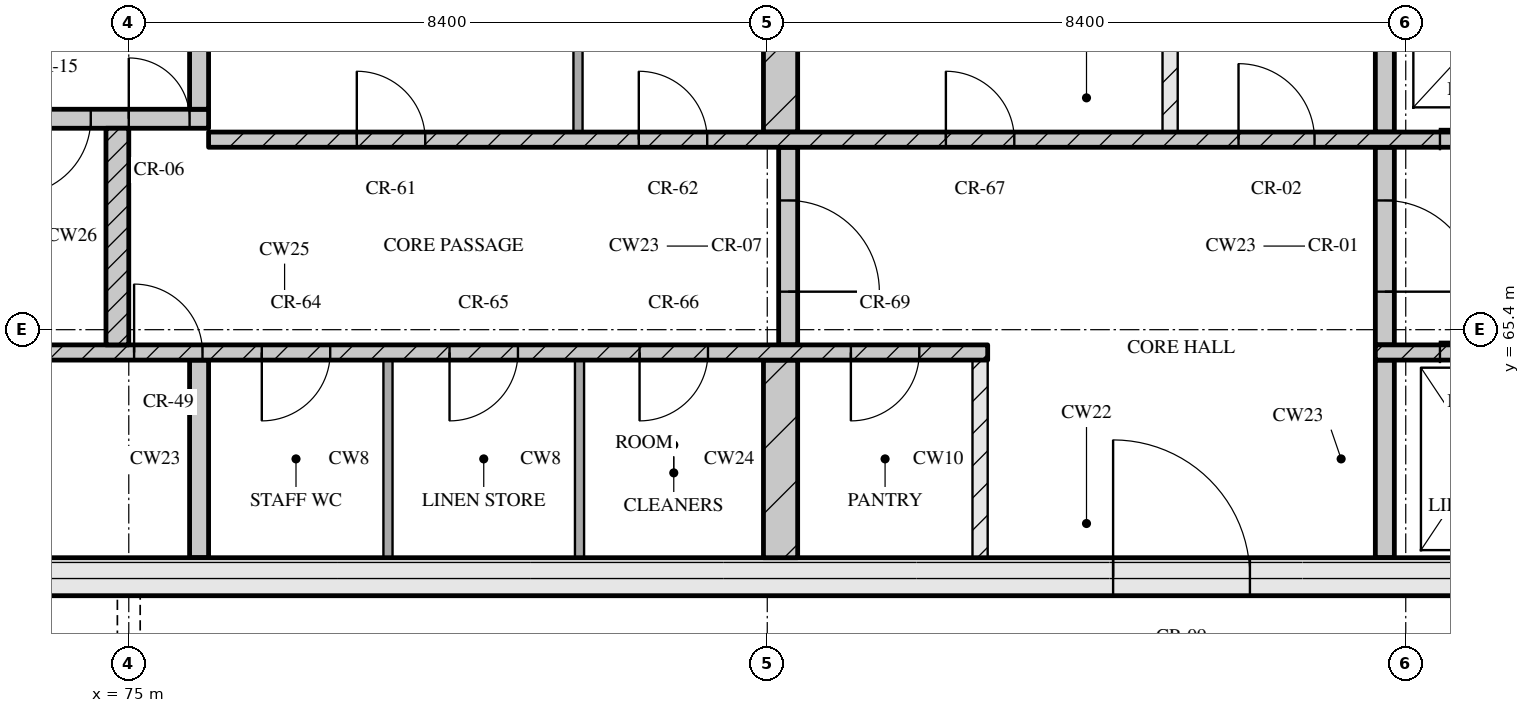
"""IFC4 building model, lengths in metres.
Left out: names, types, materials, properties, quantities, classifications, styles, units other than length and angle.
Written with IfcOpenShell. Run it as: python <this file> out.ifc"""

import sys

from ifc_helpers import new_model, si_unit, direction, frame, frame_2d, origin, place, context, subcontext, project, spatial, rectangle, extrude, element, fill, save


model = new_model("IFC4")
c1 = context("Model", 3, precision=1e-05, world=origin(), true_north=direction((0.0, 1.0)))
c2 = subcontext(c1, "Body", "Model", "MODEL_VIEW")
j1 = project(units=[si_unit("LENGTHUNIT", "METRE"), si_unit("PLANEANGLEUNIT", "RADIAN")], contexts=[c1])
p1 = place(None, origin())
s1 = spatial("IfcSite", under=j1, at=p1, CompositionType="ELEMENT")
p2 = place(p1, origin())
s2 = spatial("IfcBuilding", under=s1, at=p2, CompositionType="ELEMENT")
p3 = place(p2, frame((0.0, 0.0, 292.35)))
s3 = spatial("IfcBuildingStorey", under=s2, at=p3, CompositionType="ELEMENT", Elevation=292.35)
p4 = place(p3, frame((67.3, 62.15, 0.0), z_axis=(0.0, 0.0, 1.0), x_axis=(1.0, 0.0, 0.0)))
e1 = element("IfcWall", 1, at=p4, inside=s3, PredefinedType="SOLIDWALL", context=c2, shape_type="SweptSolid", body=[
    extrude(rectangle(XDim=40.6, YDim=0.5, at=frame_2d((20.3, 0.0))), origin(), (0.0, 0.0, 1.0), 3.32),
])
p5 = place(p4, frame((20.65, 0.0, 0.0)))
e2 = element("IfcOpeningElement", 2, at=p5, cuts=e1, PredefinedType="OPENING", context=c2, shape_type="SweptSolid", body=[
    extrude(rectangle(XDim=1.8, YDim=2.1, at=frame_2d((0.9, 1.05))), frame((0.0, 0.26, 0.0), z_axis=(0.0, -1.0, 0.0), x_axis=(1.0, 0.0, 0.0)), (0.0, 0.0, 1.0), 0.52),
])
p6 = place(p3, frame((75.925, 62.4, 0.0), z_axis=(0.0, 0.0, 1.0), x_axis=(0.0, 1.0, 0.0)))
e3 = element("IfcWall", 3, at=p6, inside=s3, PredefinedType="SOLIDWALL", context=c2, shape_type="SweptSolid", body=[
    extrude(rectangle(XDim=2.6, YDim=0.25, at=frame_2d((1.3, 0.0))), origin(), (0.0, 0.0, 1.0), 3.32),
])
for number, where, z_axis, x_axis in (
    (4, (78.41, 62.4, 0.0), (0.0, 0.0, 1.0), (0.0, 1.0, 0.0)),
    (5, (80.93, 62.4, 0.0), (0.0, 0.0, 1.0), (0.0, 1.0, 0.0)),
):
    element("IfcWall", number, at=place(p3, frame(where, z_axis=z_axis, x_axis=x_axis)), inside=s3, PredefinedType="PARTITIONING", context=c2, shape_type="SweptSolid", body=[
        extrude(rectangle(XDim=2.6, YDim=0.12, at=frame_2d((1.3, 0.0))), origin(), (0.0, 0.0, 1.0), 3.32),
    ])
p7 = place(p3, frame((83.575, 62.4, 0.0), z_axis=(0.0, 0.0, 1.0), x_axis=(0.0, 1.0, 0.0)))
e6 = element("IfcWall", 6, at=p7, inside=s3, PredefinedType="SOLIDWALL", context=c2, shape_type="SweptSolid", body=[
    extrude(rectangle(XDim=2.6, YDim=0.45, at=frame_2d((1.3, 0.0))), origin(), (0.0, 0.0, 1.0), 3.32),
])
p8 = place(p3, frame((86.2, 62.4, 0.0), z_axis=(0.0, 0.0, 1.0), x_axis=(0.0, 1.0, 0.0)))
e7 = element("IfcWall", 7, at=p8, inside=s3, PredefinedType="PARTITIONING", context=c2, shape_type="SweptSolid", body=[
    extrude(rectangle(XDim=2.6, YDim=0.2, at=frame_2d((1.3, 0.0))), origin(), (0.0, 0.0, 1.0), 3.32),
])
p9 = place(p3, frame((91.525, 62.4, 0.0), z_axis=(0.0, 0.0, 1.0), x_axis=(0.0, 1.0, 0.0)))
e8 = element("IfcWall", 8, at=p9, inside=s3, PredefinedType="SOLIDWALL", context=c2, shape_type="SweptSolid", body=[
    extrude(rectangle(XDim=2.6, YDim=0.25, at=frame_2d((1.3, 0.0))), origin(), (0.0, 0.0, 1.0), 3.32),
])
p10 = place(p3, frame((67.8, 65.1, 0.0), z_axis=(0.0, 0.0, 1.0), x_axis=(1.0, 0.0, 0.0)))
e9 = element("IfcWall", 9, at=p10, inside=s3, PredefinedType="SOLIDWALL", context=c2, shape_type="SweptSolid", body=[
    extrude(rectangle(XDim=18.5, YDim=0.2, at=frame_2d((9.25, 0.0))), origin(), (0.0, 0.0, 1.0), 3.32),
])
p11 = place(p10, frame((7.27, 0.0, 0.0)))
e10 = element("IfcOpeningElement", 10, at=p11, cuts=e9, PredefinedType="OPENING", context=c2, shape_type="SweptSolid", body=[
    extrude(rectangle(XDim=0.9, YDim=2.1, at=frame_2d((0.45, 1.05))), frame((0.0, 0.11, 0.0), z_axis=(0.0, -1.0, 0.0), x_axis=(1.0, 0.0, 0.0)), (0.0, 0.0, 1.0), 0.22),
])
p12 = place(p10, frame((8.95, 0.0, 0.0)))
e11 = element("IfcOpeningElement", 11, at=p12, cuts=e9, PredefinedType="OPENING", context=c2, shape_type="SweptSolid", body=[
    extrude(rectangle(XDim=0.9, YDim=2.1, at=frame_2d((0.45, 1.05))), frame((0.0, 0.11, 0.0), z_axis=(0.0, -1.0, 0.0), x_axis=(1.0, 0.0, 0.0)), (0.0, 0.0, 1.0), 0.22),
])
p13 = place(p10, frame((11.42, 0.0, 0.0)))
e12 = element("IfcOpeningElement", 12, at=p13, cuts=e9, PredefinedType="OPENING", context=c2, shape_type="SweptSolid", body=[
    extrude(rectangle(XDim=0.9, YDim=2.1, at=frame_2d((0.45, 1.05))), frame((0.0, 0.11, 0.0), z_axis=(0.0, -1.0, 0.0), x_axis=(1.0, 0.0, 0.0)), (0.0, 0.0, 1.0), 0.22),
])
p14 = place(p10, frame((13.92, 0.0, 0.0)))
e13 = element("IfcOpeningElement", 13, at=p14, cuts=e9, PredefinedType="OPENING", context=c2, shape_type="SweptSolid", body=[
    extrude(rectangle(XDim=0.9, YDim=2.1, at=frame_2d((0.45, 1.05))), frame((0.0, 0.11, 0.0), z_axis=(0.0, -1.0, 0.0), x_axis=(1.0, 0.0, 0.0)), (0.0, 0.0, 1.0), 0.22),
])
p15 = place(p10, frame((16.7, 0.0, 0.0)))
e14 = element("IfcOpeningElement", 14, at=p15, cuts=e9, PredefinedType="OPENING", context=c2, shape_type="SweptSolid", body=[
    extrude(rectangle(XDim=0.9, YDim=2.1, at=frame_2d((0.45, 1.05))), frame((0.0, 0.11, 0.0), z_axis=(0.0, -1.0, 0.0), x_axis=(1.0, 0.0, 0.0)), (0.0, 0.0, 1.0), 0.22),
])
p16 = place(p3, frame((91.4, 65.1, 0.0), z_axis=(0.0, 0.0, 1.0), x_axis=(1.0, 0.0, 0.0)))
e15 = element("IfcWall", 15, at=p16, inside=s3, PredefinedType="SOLIDWALL", context=c2, shape_type="SweptSolid", body=[
    extrude(rectangle(XDim=16.0, YDim=0.2, at=frame_2d((8.0, 0.0))), origin(), (0.0, 0.0, 1.0), 3.32),
])
p17 = place(p16, frame((0.85, 0.0, 0.0)))
e16 = element("IfcOpeningElement", 16, at=p17, cuts=e15, PredefinedType="OPENING", context=c2, shape_type="SweptSolid", body=[
    extrude(rectangle(XDim=1.1, YDim=2.1, at=frame_2d((0.55, 1.05))), frame((0.0, 0.11, 0.0), z_axis=(0.0, -1.0, 0.0), x_axis=(1.0, 0.0, 0.0)), (0.0, 0.0, 1.0), 0.22),
])
p18 = place(p16, frame((3.35, 0.0, 0.0)))
e17 = element("IfcOpeningElement", 17, at=p18, cuts=e15, PredefinedType="OPENING", context=c2, shape_type="SweptSolid", body=[
    extrude(rectangle(XDim=1.1, YDim=2.1, at=frame_2d((0.55, 1.05))), frame((0.0, 0.11, 0.0), z_axis=(0.0, -1.0, 0.0), x_axis=(1.0, 0.0, 0.0)), (0.0, 0.0, 1.0), 0.22),
])
p19 = place(p16, frame((5.85, 0.0, 0.0)))
e18 = element("IfcOpeningElement", 18, at=p19, cuts=e15, PredefinedType="OPENING", context=c2, shape_type="SweptSolid", body=[
    extrude(rectangle(XDim=1.1, YDim=2.1, at=frame_2d((0.55, 1.05))), frame((0.0, 0.11, 0.0), z_axis=(0.0, -1.0, 0.0), x_axis=(1.0, 0.0, 0.0)), (0.0, 0.0, 1.0), 0.22),
])
p20 = place(p16, frame((7.83, 0.0, 0.0)))
e19 = element("IfcOpeningElement", 19, at=p20, cuts=e15, PredefinedType="OPENING", context=c2, shape_type="SweptSolid", body=[
    extrude(rectangle(XDim=0.9, YDim=2.1, at=frame_2d((0.45, 1.05))), frame((0.0, 0.11, 0.0), z_axis=(0.0, -1.0, 0.0), x_axis=(1.0, 0.0, 0.0)), (0.0, 0.0, 1.0), 0.22),
])
p21 = place(p3, frame((74.85, 65.2, 0.0), z_axis=(0.0, 0.0, 1.0), x_axis=(0.0, 1.0, 0.0)))
e20 = element("IfcWall", 20, at=p21, inside=s3, PredefinedType="SOLIDWALL", context=c2, shape_type="SweptSolid", body=[
    extrude(rectangle(XDim=2.85, YDim=0.3, at=frame_2d((1.425, 0.0))), origin(), (0.0, 0.0, 1.0), 3.32),
])
p22 = place(p3, frame((83.675, 65.2, 0.0), z_axis=(0.0, 0.0, 1.0), x_axis=(0.0, 1.0, 0.0)))
e21 = element("IfcWall", 21, at=p22, inside=s3, PredefinedType="SOLIDWALL", context=c2, shape_type="SweptSolid", body=[
    extrude(rectangle(XDim=2.6, YDim=0.25, at=frame_2d((1.3, 0.0))), origin(), (0.0, 0.0, 1.0), 3.32),
])
p23 = place(p22, frame((0.7, 0.0, 0.0)))
e22 = element("IfcOpeningElement", 22, at=p23, cuts=e21, PredefinedType="OPENING", context=c2, shape_type="SweptSolid", body=[
    extrude(rectangle(XDim=1.2, YDim=2.1, at=frame_2d((0.6, 1.05))), frame((0.0, 0.135, 0.0), z_axis=(0.0, -1.0, 0.0), x_axis=(1.0, 0.0, 0.0)), (0.0, 0.0, 1.0), 0.27),
])
p24 = place(p3, frame((91.525, 65.2, 0.0), z_axis=(0.0, 0.0, 1.0), x_axis=(0.0, 1.0, 0.0)))
e23 = element("IfcWall", 23, at=p24, inside=s3, PredefinedType="SOLIDWALL", context=c2, shape_type="SweptSolid", body=[
    extrude(rectangle(XDim=2.6, YDim=0.25, at=frame_2d((1.3, 0.0))), origin(), (0.0, 0.0, 1.0), 3.32),
])
p25 = place(p24, frame((0.7, 0.0, 0.0)))
e24 = element("IfcOpeningElement", 24, at=p25, cuts=e23, PredefinedType="OPENING", context=c2, shape_type="SweptSolid", body=[
    extrude(rectangle(XDim=1.2, YDim=2.1, at=frame_2d((0.6, 1.05))), frame((0.0, 0.135, 0.0), z_axis=(0.0, -1.0, 0.0), x_axis=(1.0, 0.0, 0.0)), (0.0, 0.0, 1.0), 0.27),
])
p26 = place(p3, frame((76.05, 67.9, 0.0), z_axis=(0.0, 0.0, 1.0), x_axis=(1.0, 0.0, 0.0)))
e25 = element("IfcWall", 25, at=p26, inside=s3, PredefinedType="SOLIDWALL", context=c2, shape_type="SweptSolid", body=[
    extrude(rectangle(XDim=23.1, YDim=0.2, at=frame_2d((11.55, 0.0))), origin(), (0.0, 0.0, 1.0), 3.32),
])
p27 = place(p26, frame((1.95, 0.0, 0.0)))
e26 = element("IfcOpeningElement", 26, at=p27, cuts=e25, PredefinedType="OPENING", context=c2, shape_type="SweptSolid", body=[
    extrude(rectangle(XDim=0.9, YDim=2.1, at=frame_2d((0.45, 1.05))), frame((0.0, 0.11, 0.0), z_axis=(0.0, -1.0, 0.0), x_axis=(1.0, 0.0, 0.0)), (0.0, 0.0, 1.0), 0.22),
])
p28 = place(p26, frame((5.66, 0.0, 0.0)))
e27 = element("IfcOpeningElement", 27, at=p28, cuts=e25, PredefinedType="OPENING", context=c2, shape_type="SweptSolid", body=[
    extrude(rectangle(XDim=0.9, YDim=2.1, at=frame_2d((0.45, 1.05))), frame((0.0, 0.11, 0.0), z_axis=(0.0, -1.0, 0.0), x_axis=(1.0, 0.0, 0.0)), (0.0, 0.0, 1.0), 0.22),
])
p29 = place(p26, frame((9.7, 0.0, 0.0)))
e28 = element("IfcOpeningElement", 28, at=p29, cuts=e25, PredefinedType="OPENING", context=c2, shape_type="SweptSolid", body=[
    extrude(rectangle(XDim=0.9, YDim=2.1, at=frame_2d((0.45, 1.05))), frame((0.0, 0.11, 0.0), z_axis=(0.0, -1.0, 0.0), x_axis=(1.0, 0.0, 0.0)), (0.0, 0.0, 1.0), 0.22),
])
p30 = place(p26, frame((13.55, 0.0, 0.0)))
e29 = element("IfcOpeningElement", 29, at=p30, cuts=e25, PredefinedType="OPENING", context=c2, shape_type="SweptSolid", body=[
    extrude(rectangle(XDim=1.0, YDim=2.1, at=frame_2d((0.5, 1.05))), frame((0.0, 0.11, 0.0), z_axis=(0.0, -1.0, 0.0), x_axis=(1.0, 0.0, 0.0)), (0.0, 0.0, 1.0), 0.22),
])
p31 = place(p26, frame((16.2, 0.0, 0.0)))
e30 = element("IfcOpeningElement", 30, at=p31, cuts=e25, PredefinedType="OPENING", context=c2, shape_type="SweptSolid", body=[
    extrude(rectangle(XDim=1.1, YDim=2.1, at=frame_2d((0.55, 1.05))), frame((0.0, 0.11, 0.0), z_axis=(0.0, -1.0, 0.0), x_axis=(1.0, 0.0, 0.0)), (0.0, 0.0, 1.0), 0.22),
])
p32 = place(p26, frame((18.7, 0.0, 0.0)))
e31 = element("IfcOpeningElement", 31, at=p32, cuts=e25, PredefinedType="OPENING", context=c2, shape_type="SweptSolid", body=[
    extrude(rectangle(XDim=1.1, YDim=2.1, at=frame_2d((0.55, 1.05))), frame((0.0, 0.11, 0.0), z_axis=(0.0, -1.0, 0.0), x_axis=(1.0, 0.0, 0.0)), (0.0, 0.0, 1.0), 0.22),
])
p33 = place(p26, frame((21.2, 0.0, 0.0)))
e32 = element("IfcOpeningElement", 32, at=p33, cuts=e25, PredefinedType="OPENING", context=c2, shape_type="SweptSolid", body=[
    extrude(rectangle(XDim=1.1, YDim=2.1, at=frame_2d((0.55, 1.05))), frame((0.0, 0.11, 0.0), z_axis=(0.0, -1.0, 0.0), x_axis=(1.0, 0.0, 0.0)), (0.0, 0.0, 1.0), 0.22),
])
p34 = place(p3, frame((80.91, 68.0, 0.0), z_axis=(0.0, 0.0, 1.0), x_axis=(0.0, 1.0, 0.0)))
e33 = element("IfcWall", 33, at=p34, inside=s3, PredefinedType="PARTITIONING", context=c2, shape_type="SweptSolid", body=[
    extrude(rectangle(XDim=2.6, YDim=0.12, at=frame_2d((1.3, 0.0))), origin(), (0.0, 0.0, 1.0), 3.32),
])
p35 = place(p3, frame((83.575, 68.0, 0.0), z_axis=(0.0, 0.0, 1.0), x_axis=(0.0, 1.0, 0.0)))
e34 = element("IfcWall", 34, at=p35, inside=s3, PredefinedType="SOLIDWALL", context=c2, shape_type="SweptSolid", body=[
    extrude(rectangle(XDim=2.6, YDim=0.45, at=frame_2d((1.3, 0.0))), origin(), (0.0, 0.0, 1.0), 3.32),
])
p36 = place(p3, frame((88.7, 68.0, 0.0), z_axis=(0.0, 0.0, 1.0), x_axis=(0.0, 1.0, 0.0)))
e35 = element("IfcWall", 35, at=p36, inside=s3, PredefinedType="PARTITIONING", context=c2, shape_type="SweptSolid", body=[
    extrude(rectangle(XDim=2.6, YDim=0.2, at=frame_2d((1.3, 0.0))), origin(), (0.0, 0.0, 1.0), 3.32),
])
p37 = place(p3, frame((91.525, 68.0, 0.0), z_axis=(0.0, 0.0, 1.0), x_axis=(0.0, 1.0, 0.0)))
e36 = element("IfcWall", 36, at=p37, inside=s3, PredefinedType="SOLIDWALL", context=c2, shape_type="SweptSolid", body=[
    extrude(rectangle(XDim=2.6, YDim=0.25, at=frame_2d((1.3, 0.0))), origin(), (0.0, 0.0, 1.0), 3.32),
])
p38 = place(p3, frame((67.8, 68.175, 0.0), z_axis=(0.0, 0.0, 1.0), x_axis=(1.0, 0.0, 0.0)))
e37 = element("IfcWall", 37, at=p38, inside=s3, PredefinedType="SOLIDWALL", context=c2, shape_type="SweptSolid", body=[
    extrude(rectangle(XDim=8.25, YDim=0.25, at=frame_2d((4.125, 0.0))), origin(), (0.0, 0.0, 1.0), 3.32),
])
p39 = place(p38, frame((5.7, 0.0, 0.0)))
e38 = element("IfcOpeningElement", 38, at=p39, cuts=e37, PredefinedType="OPENING", context=c2, shape_type="SweptSolid", body=[
    extrude(rectangle(XDim=1.0, YDim=2.1, at=frame_2d((0.5, 1.05))), frame((0.0, 0.135, 0.0), z_axis=(0.0, -1.0, 0.0), x_axis=(1.0, 0.0, 0.0)), (0.0, 0.0, 1.0), 0.27),
])
p40 = place(p38, frame((7.2, 0.0, 0.0)))
e39 = element("IfcOpeningElement", 39, at=p40, cuts=e37, PredefinedType="OPENING", context=c2, shape_type="SweptSolid", body=[
    extrude(rectangle(XDim=0.8, YDim=2.1, at=frame_2d((0.4, 1.05))), frame((0.0, 0.135, 0.0), z_axis=(0.0, -1.0, 0.0), x_axis=(1.0, 0.0, 0.0)), (0.0, 0.0, 1.0), 0.27),
])
p41 = place(p3, frame((75.925, 68.3, 0.0), z_axis=(0.0, 0.0, 1.0), x_axis=(0.0, 1.0, 0.0)))
e40 = element("IfcWall", 40, at=p41, inside=s3, PredefinedType="SOLIDWALL", context=c2, shape_type="SweptSolid", body=[
    extrude(rectangle(XDim=2.3, YDim=0.25, at=frame_2d((1.15, 0.0))), origin(), (0.0, 0.0, 1.0), 3.32),
])
p42 = place(p5, origin())
e41 = element("IfcDoor", 41, at=p42, inside=s3, OperationType="DOUBLE_DOOR_SINGLE_SWING", PredefinedType="DOOR", context=c2, shape_type="SweptSolid", body=[
    extrude(rectangle(XDim=1.8, YDim=2.1, at=frame_2d((0.9, 1.05))), frame((0.0, 0.025, 0.0), z_axis=(0.0, -1.0, 0.0), x_axis=(1.0, 0.0, 0.0)), (0.0, 0.0, 1.0), 0.05),
])
fill(e2, e41)
p43 = place(p11, origin())
e42 = element("IfcDoor", 42, at=p43, inside=s3, OperationType="SINGLE_SWING_LEFT", PredefinedType="DOOR", context=c2, shape_type="SweptSolid", body=[
    extrude(rectangle(XDim=0.9, YDim=2.1, at=frame_2d((0.45, 1.05))), frame((0.0, 0.025, 0.0), z_axis=(0.0, -1.0, 0.0), x_axis=(1.0, 0.0, 0.0)), (0.0, 0.0, 1.0), 0.05),
])
fill(e10, e42)
p44 = place(p12, origin())
e43 = element("IfcDoor", 43, at=p44, inside=s3, OperationType="SINGLE_SWING_RIGHT", PredefinedType="DOOR", context=c2, shape_type="SweptSolid", body=[
    extrude(rectangle(XDim=0.9, YDim=2.1, at=frame_2d((0.45, 1.05))), frame((0.0, 0.025, 0.0), z_axis=(0.0, -1.0, 0.0), x_axis=(1.0, 0.0, 0.0)), (0.0, 0.0, 1.0), 0.05),
])
fill(e11, e43)
p45 = place(p13, origin())
e44 = element("IfcDoor", 44, at=p45, inside=s3, OperationType="SINGLE_SWING_RIGHT", PredefinedType="DOOR", context=c2, shape_type="SweptSolid", body=[
    extrude(rectangle(XDim=0.9, YDim=2.1, at=frame_2d((0.45, 1.05))), frame((0.0, 0.025, 0.0), z_axis=(0.0, -1.0, 0.0), x_axis=(1.0, 0.0, 0.0)), (0.0, 0.0, 1.0), 0.05),
])
fill(e12, e44)
p46 = place(p14, origin())
e45 = element("IfcDoor", 45, at=p46, inside=s3, OperationType="SINGLE_SWING_RIGHT", PredefinedType="DOOR", context=c2, shape_type="SweptSolid", body=[
    extrude(rectangle(XDim=0.9, YDim=2.1, at=frame_2d((0.45, 1.05))), frame((0.0, 0.025, 0.0), z_axis=(0.0, -1.0, 0.0), x_axis=(1.0, 0.0, 0.0)), (0.0, 0.0, 1.0), 0.05),
])
fill(e13, e45)
p47 = place(p15, origin())
e46 = element("IfcDoor", 46, at=p47, inside=s3, OperationType="SINGLE_SWING_RIGHT", PredefinedType="DOOR", context=c2, shape_type="SweptSolid", body=[
    extrude(rectangle(XDim=0.9, YDim=2.1, at=frame_2d((0.45, 1.05))), frame((0.0, 0.025, 0.0), z_axis=(0.0, -1.0, 0.0), x_axis=(1.0, 0.0, 0.0)), (0.0, 0.0, 1.0), 0.05),
])
fill(e14, e46)
p48 = place(p17, origin())
e47 = element("IfcDoor", 47, at=p48, inside=s3, OperationType="SLIDING_TO_LEFT", PredefinedType="DOOR", context=c2, shape_type="SweptSolid", body=[
    extrude(rectangle(XDim=1.1, YDim=2.1, at=frame_2d((0.55, 1.05))), frame((0.0, 0.025, 0.0), z_axis=(0.0, -1.0, 0.0), x_axis=(1.0, 0.0, 0.0)), (0.0, 0.0, 1.0), 0.05),
])
fill(e16, e47)
p49 = place(p23, origin())
e48 = element("IfcDoor", 48, at=p49, inside=s3, OperationType="SINGLE_SWING_RIGHT", PredefinedType="DOOR", context=c2, shape_type="SweptSolid", body=[
    extrude(rectangle(XDim=1.2, YDim=2.1, at=frame_2d((0.6, 1.05))), frame((0.0, 0.025, 0.0), z_axis=(0.0, -1.0, 0.0), x_axis=(1.0, 0.0, 0.0)), (0.0, 0.0, 1.0), 0.05),
])
fill(e22, e48)
p50 = place(p25, origin())
e49 = element("IfcDoor", 49, at=p50, inside=s3, OperationType="SINGLE_SWING_RIGHT", PredefinedType="DOOR", context=c2, shape_type="SweptSolid", body=[
    extrude(rectangle(XDim=1.2, YDim=2.1, at=frame_2d((0.6, 1.05))), frame((0.0, 0.025, 0.0), z_axis=(0.0, -1.0, 0.0), x_axis=(1.0, 0.0, 0.0)), (0.0, 0.0, 1.0), 0.05),
])
fill(e24, e49)
p51 = place(p27, origin())
e50 = element("IfcDoor", 50, at=p51, inside=s3, OperationType="SINGLE_SWING_LEFT", PredefinedType="DOOR", context=c2, shape_type="SweptSolid", body=[
    extrude(rectangle(XDim=0.9, YDim=2.1, at=frame_2d((0.45, 1.05))), frame((0.0, 0.025, 0.0), z_axis=(0.0, -1.0, 0.0), x_axis=(1.0, 0.0, 0.0)), (0.0, 0.0, 1.0), 0.05),
])
fill(e26, e50)
p52 = place(p28, origin())
e51 = element("IfcDoor", 51, at=p52, inside=s3, OperationType="SINGLE_SWING_LEFT", PredefinedType="DOOR", context=c2, shape_type="SweptSolid", body=[
    extrude(rectangle(XDim=0.9, YDim=2.1, at=frame_2d((0.45, 1.05))), frame((0.0, 0.025, 0.0), z_axis=(0.0, -1.0, 0.0), x_axis=(1.0, 0.0, 0.0)), (0.0, 0.0, 1.0), 0.05),
])
fill(e27, e51)
p53 = place(p29, origin())
e52 = element("IfcDoor", 52, at=p53, inside=s3, OperationType="SINGLE_SWING_LEFT", PredefinedType="DOOR", context=c2, shape_type="SweptSolid", body=[
    extrude(rectangle(XDim=0.9, YDim=2.1, at=frame_2d((0.45, 1.05))), frame((0.0, 0.025, 0.0), z_axis=(0.0, -1.0, 0.0), x_axis=(1.0, 0.0, 0.0)), (0.0, 0.0, 1.0), 0.05),
])
fill(e28, e52)
p54 = place(p30, origin())
e53 = element("IfcDoor", 53, at=p54, inside=s3, OperationType="SINGLE_SWING_LEFT", PredefinedType="DOOR", context=c2, shape_type="SweptSolid", body=[
    extrude(rectangle(XDim=1.0, YDim=2.1, at=frame_2d((0.5, 1.05))), frame((0.0, 0.025, 0.0), z_axis=(0.0, -1.0, 0.0), x_axis=(1.0, 0.0, 0.0)), (0.0, 0.0, 1.0), 0.05),
])
fill(e29, e53)
p55 = place(p31, origin())
e54 = element("IfcDoor", 54, at=p55, inside=s3, OperationType="SLIDING_TO_RIGHT", PredefinedType="DOOR", context=c2, shape_type="SweptSolid", body=[
    extrude(rectangle(XDim=1.1, YDim=2.1, at=frame_2d((0.55, 1.05))), frame((0.0, 0.025, 0.0), z_axis=(0.0, -1.0, 0.0), x_axis=(1.0, 0.0, 0.0)), (0.0, 0.0, 1.0), 0.05),
])
fill(e30, e54)
p56 = place(p39, origin())
e55 = element("IfcDoor", 55, at=p56, inside=s3, OperationType="SINGLE_SWING_RIGHT", PredefinedType="DOOR", context=c2, shape_type="SweptSolid", body=[
    extrude(rectangle(XDim=1.0, YDim=2.1, at=frame_2d((0.5, 1.05))), frame((0.0, 0.025, 0.0), z_axis=(0.0, -1.0, 0.0), x_axis=(1.0, 0.0, 0.0)), (0.0, 0.0, 1.0), 0.05),
])
fill(e38, e55)
p57 = place(p40, origin())
e56 = element("IfcDoor", 56, at=p57, inside=s3, OperationType="SINGLE_SWING_LEFT", PredefinedType="DOOR", context=c2, shape_type="SweptSolid", body=[
    extrude(rectangle(XDim=0.8, YDim=2.1, at=frame_2d((0.4, 1.05))), frame((0.0, 0.025, 0.0), z_axis=(0.0, -1.0, 0.0), x_axis=(1.0, 0.0, 0.0)), (0.0, 0.0, 1.0), 0.05),
])
fill(e39, e56)
save(model, sys.argv[1])
